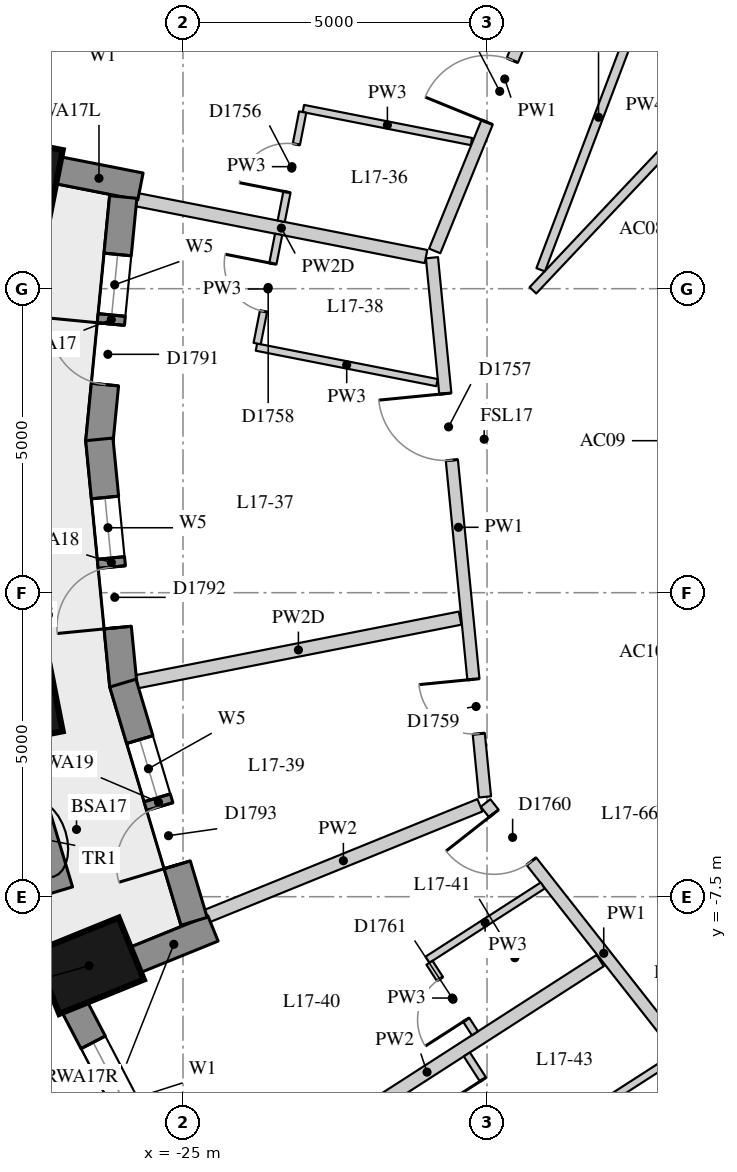
"""IFC4 building model, lengths in metres.
Left out: names, types, materials, properties, quantities, classifications, styles, units other than length and angle.
Written with IfcOpenShell. Run it as: python <this file> out.ifc"""

import sys

from ifc_helpers import new_model, si_unit, direction, frame, frame_2d, origin, origin_2d, place, context, subcontext, project, spatial, rectangle, extrude, element, fill, save


model = new_model("IFC4")
c1 = context("Model", 3, precision=1e-05, world=origin(), true_north=direction((0.0, 1.0)))
c2 = subcontext(c1, "Body", "Model", "MODEL_VIEW")
j1 = project(units=[si_unit("LENGTHUNIT", "METRE"), si_unit("PLANEANGLEUNIT", "RADIAN")], contexts=[c1])
p1 = place(None, origin())
s1 = spatial("IfcSite", under=j1, at=p1, CompositionType="ELEMENT")
p2 = place(p1, origin())
s2 = spatial("IfcBuilding", under=s1, at=p2, CompositionType="ELEMENT")
p3 = place(p2, frame((0.0, 0.0, 64.6)))
s3 = spatial("IfcBuildingStorey", under=s2, at=p3, CompositionType="ELEMENT", Elevation=64.6)
for number, where, z_axis, x_axis in (
    (1, (-27.821, 4.385, 0.0), (0.0, 0.0, 1.0), (-0.981, 0.193, 0.0)),
    (2, (-27.821, -4.385, 0.0), (0.0, 0.0, 1.0), (-0.981, -0.193, 0.0)),
    (3, (-26.546, -8.636, 0.0), (0.0, 0.0, 1.0), (-0.927, -0.376, 0.0)),
):
    element("IfcColumn", number, at=place(p3, frame(where, z_axis=z_axis, x_axis=x_axis)), inside=s3, PredefinedType="COLUMN", context=c2, shape_type="SweptSolid", body=[
        extrude(rectangle(XDim=1.5, YDim=1.1, at=origin_2d()), origin(), (0.0, 0.0, 1.0), 3.3),
    ])
p4 = place(p3, frame((-27.185, 8.323, 0.0), z_axis=(0.0, 0.0, 1.0), x_axis=(-0.287064133733, -0.957911364963, 0.0)))
e4 = element("IfcWall", 4, at=p4, inside=s3, PredefinedType="SOLIDWALL", context=c2, shape_type="SweptSolid", body=[
    extrude(rectangle(XDim=3.473, YDim=0.45, at=frame_2d((1.737, 0.0))), origin(), (0.0, 0.0, 1.0), 3.02),
])
p5 = place(p4, frame((0.637, 0.0, 0.4)))
e5 = element("IfcOpeningElement", 5, at=p5, cuts=e4, PredefinedType="OPENING", context=c2, shape_type="SweptSolid", body=[
    extrude(rectangle(XDim=2.2, YDim=1.75, at=frame_2d((1.1, 0.875))), frame((0.0, 0.235, 0.0), z_axis=(0.0, -1.0, 0.0), x_axis=(1.0, 0.0, 0.0)), (0.0, 0.0, 1.0), 0.47),
])
p6 = place(p3, frame((-26.786, -9.305, 0.0), z_axis=(0.0, 0.0, 1.0), x_axis=(0.462492775226, -0.886623050041, 0.0)))
e6 = element("IfcWall", 6, at=p6, inside=s3, PredefinedType="SOLIDWALL", context=c2, shape_type="SweptSolid", body=[
    extrude(rectangle(XDim=3.532, YDim=0.45, at=frame_2d((1.766, 0.0))), origin(), (0.0, 0.0, 1.0), 3.02),
])
p7 = place(p6, frame((0.666, 0.0, 0.4)))
e7 = element("IfcOpeningElement", 7, at=p7, cuts=e6, PredefinedType="OPENING", context=c2, shape_type="SweptSolid", body=[
    extrude(rectangle(XDim=2.2, YDim=1.75, at=frame_2d((1.1, 0.875))), frame((0.0, 0.235, 0.0), z_axis=(0.0, -1.0, 0.0), x_axis=(1.0, 0.0, 0.0)), (0.0, 0.0, 1.0), 0.47),
])
p8 = place(p3, frame((-27.064, 4.45, 0.0), z_axis=(0.0, 0.0, 1.0), x_axis=(0.98123042829, -0.192838913596, 0.0)))
e8 = element("IfcWall", 8, at=p8, inside=s3, PredefinedType="SOLIDWALL", context=c2, shape_type="SweptSolid", body=[
    extrude(rectangle(XDim=1.39, YDim=0.45, at=frame_2d((0.695, 0.0))), origin(), (0.0, 0.0, 1.0), 2.47),
])
p9 = place(p3, frame((-25.796, -8.544, 0.0), z_axis=(0.0, 0.0, 1.0), x_axis=(0.926575599743, 0.376108572039, 0.0)))
e9 = element("IfcWall", 9, at=p9, inside=s3, PredefinedType="SOLIDWALL", context=c2, shape_type="SweptSolid", body=[
    extrude(rectangle(XDim=1.39, YDim=0.45, at=frame_2d((0.695, 0.0))), origin(), (0.0, 0.0, 1.0), 3.02),
])
p10 = place(p3, frame((-25.983, 4.008, 0.0), z_axis=(0.0, 0.0, 1.0), x_axis=(-0.097133468736, -0.995271364629, 0.0)))
e10 = element("IfcWall", 10, at=p10, inside=s3, PredefinedType="SOLIDWALL", context=c2, shape_type="SweptSolid", body=[
    extrude(rectangle(XDim=4.049, YDim=0.45, at=frame_2d((2.024, 0.0))), origin(), (0.0, 0.0, 1.0), 3.02),
])
p11 = place(p10, frame((0.949, 0.0, 0.4)))
e11 = element("IfcOpeningElement", 11, at=p11, cuts=e10, PredefinedType="OPENING", context=c2, shape_type="SweptSolid", body=[
    extrude(rectangle(XDim=1.0, YDim=1.75, at=frame_2d((0.5, 0.875))), frame((0.0, 0.235, 0.0), z_axis=(0.0, -1.0, 0.0), x_axis=(1.0, 0.0, 0.0)), (0.0, 0.0, 1.0), 0.47),
])
p12 = place(p10, frame((2.1, 0.0, 0.0)))
e12 = element("IfcOpeningElement", 12, at=p12, cuts=e10, PredefinedType="OPENING", context=c2, shape_type="SweptSolid", body=[
    extrude(rectangle(XDim=1.0, YDim=2.15, at=frame_2d((0.5, 1.075))), frame((0.0, 0.235, 0.0), z_axis=(0.0, -1.0, 0.0), x_axis=(1.0, 0.0, 0.0)), (0.0, 0.0, 1.0), 0.47),
])
p13 = place(p3, frame((-26.376, 0.022, 0.0), z_axis=(0.0, 0.0, 1.0), x_axis=(0.097092719726, -0.995275340685, 0.0)))
e13 = element("IfcWall", 13, at=p13, inside=s3, PredefinedType="SOLIDWALL", context=c2, shape_type="SweptSolid", body=[
    extrude(rectangle(XDim=4.071, YDim=0.45, at=frame_2d((2.036, 0.0))), origin(), (0.0, 0.0, 1.0), 3.02),
])
p14 = place(p13, frame((0.96, 0.0, 0.4)))
e14 = element("IfcOpeningElement", 14, at=p14, cuts=e13, PredefinedType="OPENING", context=c2, shape_type="SweptSolid", body=[
    extrude(rectangle(XDim=1.0, YDim=1.75, at=frame_2d((0.5, 0.875))), frame((0.0, 0.235, 0.0), z_axis=(0.0, -1.0, 0.0), x_axis=(1.0, 0.0, 0.0)), (0.0, 0.0, 1.0), 0.47),
])
p15 = place(p13, frame((2.111, 0.0, 0.0)))
e15 = element("IfcOpeningElement", 15, at=p15, cuts=e13, PredefinedType="OPENING", context=c2, shape_type="SweptSolid", body=[
    extrude(rectangle(XDim=1.0, YDim=2.15, at=frame_2d((0.5, 1.075))), frame((0.0, 0.235, 0.0), z_axis=(0.0, -1.0, 0.0), x_axis=(1.0, 0.0, 0.0)), (0.0, 0.0, 1.0), 0.47),
])
p16 = place(p3, frame((-25.989, -3.987, 0.0), z_axis=(0.0, 0.0, 1.0), x_axis=(0.286427456555, -0.958101932015, 0.0)))
e16 = element("IfcWall", 16, at=p16, inside=s3, PredefinedType="SOLIDWALL", context=c2, shape_type="SweptSolid", body=[
    extrude(rectangle(XDim=4.089, YDim=0.45, at=frame_2d((2.044, 0.0))), origin(), (0.0, 0.0, 1.0), 3.02),
])
p17 = place(p16, frame((0.969, 0.0, 0.4)))
e17 = element("IfcOpeningElement", 17, at=p17, cuts=e16, PredefinedType="OPENING", context=c2, shape_type="SweptSolid", body=[
    extrude(rectangle(XDim=1.0, YDim=1.75, at=frame_2d((0.5, 0.875))), frame((0.0, 0.235, 0.0), z_axis=(0.0, -1.0, 0.0), x_axis=(1.0, 0.0, 0.0)), (0.0, 0.0, 1.0), 0.47),
])
p18 = place(p16, frame((2.119, 0.0, 0.0)))
e18 = element("IfcOpeningElement", 18, at=p18, cuts=e16, PredefinedType="OPENING", context=c2, shape_type="SweptSolid", body=[
    extrude(rectangle(XDim=1.0, YDim=2.15, at=frame_2d((0.5, 1.075))), frame((0.0, 0.235, 0.0), z_axis=(0.0, -1.0, 0.0), x_axis=(1.0, 0.0, 0.0)), (0.0, 0.0, 1.0), 0.47),
])
p19 = place(p3, frame((-27.669, -5.715, 0.0), z_axis=(0.0, 0.0, 1.0), x_axis=(0.287024312863, -0.957923297465, 0.0)))
e19 = element("IfcWall", 19, at=p19, inside=s3, PredefinedType="USERDEFINED", context=c2, shape_type="SweptSolid", body=[
    extrude(rectangle(XDim=1.8, YDim=0.7, at=frame_2d((0.9, 0.0))), origin(), (0.0, 0.0, 1.0), 0.75),
])
p20 = place(p3, frame((-16.137, -10.904, 0.0), z_axis=(0.0, 0.0, 1.0), x_axis=(-0.617888403737, 0.786265807808, 0.0)))
e20 = element("IfcWall", 20, at=p20, inside=s3, PredefinedType="PARTITIONING", context=c2, shape_type="SweptSolid", body=[
    extrude(rectangle(XDim=6.29, YDim=0.2, at=frame_2d((3.145, 0.0))), origin(), (0.0, 0.0, 1.0), 3.02),
])
p21 = place(p20, frame((5.07, 0.0, 0.0)))
e21 = element("IfcOpeningElement", 21, at=p21, cuts=e20, PredefinedType="OPENING", context=c2, shape_type="SweptSolid", body=[
    extrude(rectangle(XDim=1.0, YDim=2.1, at=frame_2d((0.5, 1.05))), frame((0.0, 0.11, 0.0), z_axis=(0.0, -1.0, 0.0), x_axis=(1.0, 0.0, 0.0)), (0.0, 0.0, 1.0), 0.22),
])
p22 = place(p3, frame((-20.034, -5.858, 0.0), z_axis=(0.0, 0.0, 1.0), x_axis=(-0.097894942705, 0.995196754513, 0.0)))
e22 = element("IfcWall", 22, at=p22, inside=s3, PredefinedType="PARTITIONING", context=c2, shape_type="SweptSolid", body=[
    extrude(rectangle(XDim=8.911, YDim=0.2, at=frame_2d((4.455, 0.0))), origin(), (0.0, 0.0, 1.0), 3.02),
])
p23 = place(p22, frame((5.565, 0.0, 0.0)))
e23 = element("IfcOpeningElement", 23, at=p23, cuts=e22, PredefinedType="OPENING", context=c2, shape_type="SweptSolid", body=[
    extrude(rectangle(XDim=1.1, YDim=2.1, at=frame_2d((0.55, 1.05))), frame((0.0, 0.11, 0.0), z_axis=(0.0, -1.0, 0.0), x_axis=(1.0, 0.0, 0.0)), (0.0, 0.0, 1.0), 0.22),
])
p24 = place(p22, frame((1.044, 0.0, 0.0)))
e24 = element("IfcOpeningElement", 24, at=p24, cuts=e22, PredefinedType="OPENING", context=c2, shape_type="SweptSolid", body=[
    extrude(rectangle(XDim=0.9, YDim=2.1, at=frame_2d((0.45, 1.05))), frame((0.0, 0.11, 0.0), z_axis=(0.0, -1.0, 0.0), x_axis=(1.0, 0.0, 0.0)), (0.0, 0.0, 1.0), 0.22),
])
p25 = place(p3, frame((-20.861, 3.121, 0.0), z_axis=(0.0, 0.0, 1.0), x_axis=(0.377214346955, 0.926125983034, 0.0)))
e25 = element("IfcWall", 25, at=p25, inside=s3, PredefinedType="PARTITIONING", context=c2, shape_type="SweptSolid", body=[
    extrude(rectangle(XDim=6.107, YDim=0.2, at=frame_2d((3.054, 0.0))), origin(), (0.0, 0.0, 1.0), 3.02),
])
p26 = place(p25, frame((2.285, 0.0, 0.0)))
e26 = element("IfcOpeningElement", 26, at=p26, cuts=e25, PredefinedType="OPENING", context=c2, shape_type="SweptSolid", body=[
    extrude(rectangle(XDim=1.1, YDim=2.1, at=frame_2d((0.55, 1.05))), frame((0.0, 0.11, 0.0), z_axis=(0.0, -1.0, 0.0), x_axis=(1.0, 0.0, 0.0)), (0.0, 0.0, 1.0), 0.22),
])
p27 = place(p3, frame((-14.499, 7.501, 0.0), z_axis=(0.0, 0.0, 1.0), x_axis=(-0.686403699782, -0.727220709913, 0.0)))
e27 = element("IfcWall", 27, at=p27, inside=s3, PredefinedType="PARTITIONING", context=c2, shape_type="SweptSolid", body=[
    extrude(rectangle(XDim=6.915, YDim=0.15, at=frame_2d((3.457, 0.0))), origin(), (0.0, 0.0, 1.0), 3.02),
])
p28 = place(p3, frame((-19.118, 2.811, 0.0), z_axis=(0.0, 0.0, 1.0), x_axis=(0.35451573991, 0.935050046872, 0.0)))
e28 = element("IfcWall", 28, at=p28, inside=s3, PredefinedType="PARTITIONING", context=c2, shape_type="SweptSolid", body=[
    extrude(rectangle(XDim=5.367, YDim=0.15, at=frame_2d((2.684, 0.0))), origin(), (0.0, 0.0, 1.0), 3.02),
])
p29 = place(p3, frame((-25.761, 3.964, 0.0), z_axis=(0.0, 0.0, 1.0), x_axis=(0.981216494224, -0.192909801364, 0.0)))
e29 = element("IfcWall", 29, at=p29, inside=s3, PredefinedType="PARTITIONING", context=c2, shape_type="SweptSolid", body=[
    extrude(rectangle(XDim=4.848, YDim=0.22, at=frame_2d((2.424, 0.0))), origin(), (0.0, 0.0, 1.0), 2.47),
])
p30 = place(p3, frame((-25.761, -3.964, 0.0), z_axis=(0.0, 0.0, 1.0), x_axis=(0.981209698951, 0.192944361627, 0.0)))
e30 = element("IfcWall", 30, at=p30, inside=s3, PredefinedType="PARTITIONING", context=c2, shape_type="SweptSolid", body=[
    extrude(rectangle(XDim=5.419, YDim=0.22, at=frame_2d((2.71, 0.0))), origin(), (0.0, 0.0, 1.0), 2.47),
])
p31 = place(p3, frame((-24.608, -7.82, 0.0), z_axis=(0.0, 0.0, 1.0), x_axis=(0.92655764882, 0.376152792643, 0.0)))
e31 = element("IfcWall", 31, at=p31, inside=s3, PredefinedType="PARTITIONING", context=c2, shape_type="SweptSolid", body=[
    extrude(rectangle(XDim=4.848, YDim=0.22, at=frame_2d((2.424, 0.0))), origin(), (0.0, 0.0, 1.0), 3.02),
])
p32 = place(p3, frame((-23.835, -12.219, 0.0), z_axis=(0.0, 0.0, 1.0), x_axis=(0.840749666863, 0.541424046076, 0.0)))
e32 = element("IfcWall", 32, at=p32, inside=s3, PredefinedType="PARTITIONING", context=c2, shape_type="SweptSolid", body=[
    extrude(rectangle(XDim=6.775, YDim=0.22, at=frame_2d((3.387, 0.0))), origin(), (0.0, 0.0, 1.0), 3.02),
])
p33 = place(p3, frame((-20.257, 4.92, 0.0), z_axis=(0.0, 0.0, 1.0), x_axis=(-0.981202530622, 0.192980812261, 0.0)))
e33 = element("IfcWall", 33, at=p33, inside=s3, PredefinedType="PARTITIONING", context=c2, shape_type="SweptSolid", body=[
    extrude(rectangle(XDim=2.816, YDim=0.12, at=frame_2d((1.408, 0.0))), origin(), (0.0, 0.0, 1.0), 3.02),
])
p34 = place(p3, frame((-20.823, 0.955, 0.0), z_axis=(0.0, 0.0, 1.0), x_axis=(-0.981208735185, 0.192949262754, 0.0)))
e34 = element("IfcWall", 34, at=p34, inside=s3, PredefinedType="PARTITIONING", context=c2, shape_type="SweptSolid", body=[
    extrude(rectangle(XDim=3.025, YDim=0.12, at=frame_2d((1.513, 0.0))), origin(), (0.0, 0.0, 1.0), 3.02),
])
p35 = place(p3, frame((-19.084, -7.316, 0.0), z_axis=(0.0, 0.0, 1.0), x_axis=(-0.840762836723, -0.54140359473, 0.0)))
e35 = element("IfcWall", 35, at=p35, inside=s3, PredefinedType="PARTITIONING", context=c2, shape_type="SweptSolid", body=[
    extrude(rectangle(XDim=2.253, YDim=0.12, at=frame_2d((1.127, 0.0))), origin(), (0.0, 0.0, 1.0), 3.02),
])
p36 = place(p3, frame((-16.881, -10.12, 0.0), z_axis=(0.0, 0.0, 1.0), x_axis=(-0.840749755927, -0.541423907773, 0.0)))
e36 = element("IfcWall", 36, at=p36, inside=s3, PredefinedType="PARTITIONING", context=c2, shape_type="SweptSolid", body=[
    extrude(rectangle(XDim=2.888, YDim=0.12, at=frame_2d((1.444, 0.0))), origin(), (0.0, 0.0, 1.0), 3.02),
])
p37 = place(p3, frame((-23.032, 5.405, 0.0), z_axis=(0.0, 0.0, 1.0), x_axis=(-0.19288291118, -0.981221780524, 0.0)))
e37 = element("IfcWall", 37, at=p37, inside=s3, PredefinedType="PARTITIONING", context=c2, shape_type="SweptSolid", body=[
    extrude(rectangle(XDim=1.83, YDim=0.12, at=frame_2d((0.915, 0.0))), origin(), (0.0, 0.0, 1.0), 3.02),
])
p38 = place(p37, frame((0.54, 0.0, 0.0)))
e38 = element("IfcOpeningElement", 38, at=p38, cuts=e37, PredefinedType="OPENING", context=c2, shape_type="SweptSolid", body=[
    extrude(rectangle(XDim=0.8, YDim=2.1, at=frame_2d((0.4, 1.05))), frame((0.0, 0.07, 0.0), z_axis=(0.0, -1.0, 0.0), x_axis=(1.0, 0.0, 0.0)), (0.0, 0.0, 1.0), 0.14),
])
p39 = place(p3, frame((-23.781, 1.598, 0.0), z_axis=(0.0, 0.0, 1.0), x_axis=(0.193036598643, 0.981191557029, 0.0)))
e39 = element("IfcWall", 39, at=p39, inside=s3, PredefinedType="PARTITIONING", context=c2, shape_type="SweptSolid", body=[
    extrude(rectangle(XDim=1.83, YDim=0.12, at=frame_2d((0.915, 0.0))), origin(), (0.0, 0.0, 1.0), 3.02),
])
p40 = place(p39, frame((0.54, 0.0, 0.0)))
e40 = element("IfcOpeningElement", 40, at=p40, cuts=e39, PredefinedType="OPENING", context=c2, shape_type="SweptSolid", body=[
    extrude(rectangle(XDim=0.8, YDim=2.1, at=frame_2d((0.4, 1.05))), frame((0.0, 0.07, 0.0), z_axis=(0.0, -1.0, 0.0), x_axis=(1.0, 0.0, 0.0)), (0.0, 0.0, 1.0), 0.14),
])
p41 = place(p3, frame((-20.946, -8.587, 0.0), z_axis=(0.0, 0.0, 1.0), x_axis=(0.541526323973, -0.840683793375, 0.0)))
e41 = element("IfcWall", 41, at=p41, inside=s3, PredefinedType="PARTITIONING", context=c2, shape_type="SweptSolid", body=[
    extrude(rectangle(XDim=1.38, YDim=0.12, at=frame_2d((0.69, 0.0))), origin(), (0.0, 0.0, 1.0), 3.02),
])
p42 = place(p41, frame((0.315, 0.0, 0.0)))
e42 = element("IfcOpeningElement", 42, at=p42, cuts=e41, PredefinedType="OPENING", context=c2, shape_type="SweptSolid", body=[
    extrude(rectangle(XDim=0.8, YDim=2.1, at=frame_2d((0.4, 1.05))), frame((0.0, 0.07, 0.0), z_axis=(0.0, -1.0, 0.0), x_axis=(1.0, 0.0, 0.0)), (0.0, 0.0, 1.0), 0.14),
])
p43 = place(p3, frame((-19.341, -11.633, 0.0), z_axis=(0.0, 0.0, 1.0), x_axis=(-0.541391271501, 0.840770772055, 0.0)))
e43 = element("IfcWall", 43, at=p43, inside=s3, PredefinedType="PARTITIONING", context=c2, shape_type="SweptSolid", body=[
    extrude(rectangle(XDim=1.83, YDim=0.12, at=frame_2d((0.915, 0.0))), origin(), (0.0, 0.0, 1.0), 3.02),
])
p44 = place(p43, frame((0.54, 0.0, 0.0)))
e44 = element("IfcOpeningElement", 44, at=p44, cuts=e43, PredefinedType="OPENING", context=c2, shape_type="SweptSolid", body=[
    extrude(rectangle(XDim=0.8, YDim=2.1, at=frame_2d((0.4, 1.05))), frame((0.0, 0.07, 0.0), z_axis=(0.0, -1.0, 0.0), x_axis=(1.0, 0.0, 0.0)), (0.0, 0.0, 1.0), 0.14),
])
p45 = place(p7, origin())
e45 = element("IfcWindow", 45, at=p45, inside=s3, PartitioningType="SINGLE_PANEL", PredefinedType="WINDOW", context=c2, shape_type="SweptSolid", body=[
    extrude(rectangle(XDim=2.2, YDim=1.75, at=frame_2d((1.1, 0.875))), frame((0.0, 0.035, 0.0), z_axis=(0.0, -1.0, 0.0), x_axis=(1.0, 0.0, 0.0)), (0.0, 0.0, 1.0), 0.06),
])
fill(e7, e45)
p46 = place(p11, origin())
e46 = element("IfcWindow", 46, at=p46, inside=s3, PartitioningType="SINGLE_PANEL", PredefinedType="WINDOW", context=c2, shape_type="SweptSolid", body=[
    extrude(rectangle(XDim=1.0, YDim=1.75, at=frame_2d((0.5, 0.875))), frame((0.0, 0.035, 0.0), z_axis=(0.0, -1.0, 0.0), x_axis=(1.0, 0.0, 0.0)), (0.0, 0.0, 1.0), 0.06),
])
fill(e11, e46)
p47 = place(p12, frame((1.0, 0.0, 0.0), z_axis=(0.0, 0.0, 1.0), x_axis=(-1.0, 0.0, 0.0)))
e47 = element("IfcDoor", 47, at=p47, inside=s3, OperationType="SINGLE_SWING_RIGHT", PredefinedType="DOOR", context=c2, shape_type="SweptSolid", body=[
    extrude(rectangle(XDim=1.0, YDim=2.15, at=frame_2d((0.5, 1.075))), frame((0.0, 0.075, 0.0), z_axis=(0.0, -1.0, 0.0), x_axis=(1.0, 0.0, 0.0)), (0.0, 0.0, 1.0), 0.05),
])
fill(e12, e47)
p48 = place(p14, origin())
e48 = element("IfcWindow", 48, at=p48, inside=s3, PartitioningType="SINGLE_PANEL", PredefinedType="WINDOW", context=c2, shape_type="SweptSolid", body=[
    extrude(rectangle(XDim=1.0, YDim=1.75, at=frame_2d((0.5, 0.875))), frame((0.0, 0.035, 0.0), z_axis=(0.0, -1.0, 0.0), x_axis=(1.0, 0.0, 0.0)), (0.0, 0.0, 1.0), 0.06),
])
fill(e14, e48)
p49 = place(p15, frame((1.0, 0.0, 0.0), z_axis=(0.0, 0.0, 1.0), x_axis=(-1.0, 0.0, 0.0)))
e49 = element("IfcDoor", 49, at=p49, inside=s3, OperationType="SINGLE_SWING_LEFT", PredefinedType="DOOR", context=c2, shape_type="SweptSolid", body=[
    extrude(rectangle(XDim=1.0, YDim=2.15, at=frame_2d((0.5, 1.075))), frame((0.0, 0.075, 0.0), z_axis=(0.0, -1.0, 0.0), x_axis=(1.0, 0.0, 0.0)), (0.0, 0.0, 1.0), 0.05),
])
fill(e15, e49)
p50 = place(p17, origin())
e50 = element("IfcWindow", 50, at=p50, inside=s3, PartitioningType="SINGLE_PANEL", PredefinedType="WINDOW", context=c2, shape_type="SweptSolid", body=[
    extrude(rectangle(XDim=1.0, YDim=1.75, at=frame_2d((0.5, 0.875))), frame((0.0, 0.035, 0.0), z_axis=(0.0, -1.0, 0.0), x_axis=(1.0, 0.0, 0.0)), (0.0, 0.0, 1.0), 0.06),
])
fill(e17, e50)
p51 = place(p18, frame((1.0, 0.0, 0.0), z_axis=(0.0, 0.0, 1.0), x_axis=(-1.0, 0.0, 0.0)))
e51 = element("IfcDoor", 51, at=p51, inside=s3, OperationType="SINGLE_SWING_LEFT", PredefinedType="DOOR", context=c2, shape_type="SweptSolid", body=[
    extrude(rectangle(XDim=1.0, YDim=2.15, at=frame_2d((0.5, 1.075))), frame((0.0, 0.075, 0.0), z_axis=(0.0, -1.0, 0.0), x_axis=(1.0, 0.0, 0.0)), (0.0, 0.0, 1.0), 0.05),
])
fill(e18, e51)
p52 = place(p26, origin())
e52 = element("IfcDoor", 52, at=p52, inside=s3, OperationType="SINGLE_SWING_LEFT", PredefinedType="DOOR", context=c2, shape_type="SweptSolid", body=[
    extrude(rectangle(XDim=1.1, YDim=2.1, at=frame_2d((0.55, 1.05))), frame((0.0, 0.025, 0.0), z_axis=(0.0, -1.0, 0.0), x_axis=(1.0, 0.0, 0.0)), (0.0, 0.0, 1.0), 0.05),
])
fill(e26, e52)
p53 = place(p38, origin())
e53 = element("IfcDoor", 53, at=p53, inside=s3, OperationType="SINGLE_SWING_LEFT", PredefinedType="DOOR", context=c2, shape_type="SweptSolid", body=[
    extrude(rectangle(XDim=0.8, YDim=2.1, at=frame_2d((0.4, 1.05))), frame((0.0, 0.025, 0.0), z_axis=(0.0, -1.0, 0.0), x_axis=(1.0, 0.0, 0.0)), (0.0, 0.0, 1.0), 0.05),
])
fill(e38, e53)
p54 = place(p23, origin())
e54 = element("IfcDoor", 54, at=p54, inside=s3, OperationType="SINGLE_SWING_RIGHT", PredefinedType="DOOR", context=c2, shape_type="SweptSolid", body=[
    extrude(rectangle(XDim=1.1, YDim=2.1, at=frame_2d((0.55, 1.05))), frame((0.0, 0.025, 0.0), z_axis=(0.0, -1.0, 0.0), x_axis=(1.0, 0.0, 0.0)), (0.0, 0.0, 1.0), 0.05),
])
fill(e23, e54)
p55 = place(p40, origin())
e55 = element("IfcDoor", 55, at=p55, inside=s3, OperationType="SINGLE_SWING_RIGHT", PredefinedType="DOOR", context=c2, shape_type="SweptSolid", body=[
    extrude(rectangle(XDim=0.8, YDim=2.1, at=frame_2d((0.4, 1.05))), frame((0.0, 0.025, 0.0), z_axis=(0.0, -1.0, 0.0), x_axis=(1.0, 0.0, 0.0)), (0.0, 0.0, 1.0), 0.05),
])
fill(e40, e55)
p56 = place(p24, origin())
e56 = element("IfcDoor", 56, at=p56, inside=s3, OperationType="SINGLE_SWING_RIGHT", PredefinedType="DOOR", context=c2, shape_type="SweptSolid", body=[
    extrude(rectangle(XDim=0.9, YDim=2.1, at=frame_2d((0.45, 1.05))), frame((0.0, 0.025, 0.0), z_axis=(0.0, -1.0, 0.0), x_axis=(1.0, 0.0, 0.0)), (0.0, 0.0, 1.0), 0.05),
])
fill(e24, e56)
p57 = place(p21, origin())
e57 = element("IfcDoor", 57, at=p57, inside=s3, OperationType="SINGLE_SWING_RIGHT", PredefinedType="DOOR", context=c2, shape_type="SweptSolid", body=[
    extrude(rectangle(XDim=1.0, YDim=2.1, at=frame_2d((0.5, 1.05))), frame((0.0, 0.025, 0.0), z_axis=(0.0, -1.0, 0.0), x_axis=(1.0, 0.0, 0.0)), (0.0, 0.0, 1.0), 0.05),
])
fill(e21, e57)
p58 = place(p42, origin())
e58 = element("IfcDoor", 58, at=p58, inside=s3, OperationType="SINGLE_SWING_LEFT", PredefinedType="DOOR", context=c2, shape_type="SweptSolid", body=[
    extrude(rectangle(XDim=0.8, YDim=2.1, at=frame_2d((0.4, 1.05))), frame((0.0, 0.025, 0.0), z_axis=(0.0, -1.0, 0.0), x_axis=(1.0, 0.0, 0.0)), (0.0, 0.0, 1.0), 0.05),
])
fill(e42, e58)
p59 = place(p44, origin())
e59 = element("IfcDoor", 59, at=p59, inside=s3, OperationType="SINGLE_SWING_RIGHT", PredefinedType="DOOR", context=c2, shape_type="SweptSolid", body=[
    extrude(rectangle(XDim=0.8, YDim=2.1, at=frame_2d((0.4, 1.05))), frame((0.0, 0.025, 0.0), z_axis=(0.0, -1.0, 0.0), x_axis=(1.0, 0.0, 0.0)), (0.0, 0.0, 1.0), 0.05),
])
fill(e44, e59)
save(model, sys.argv[1])
